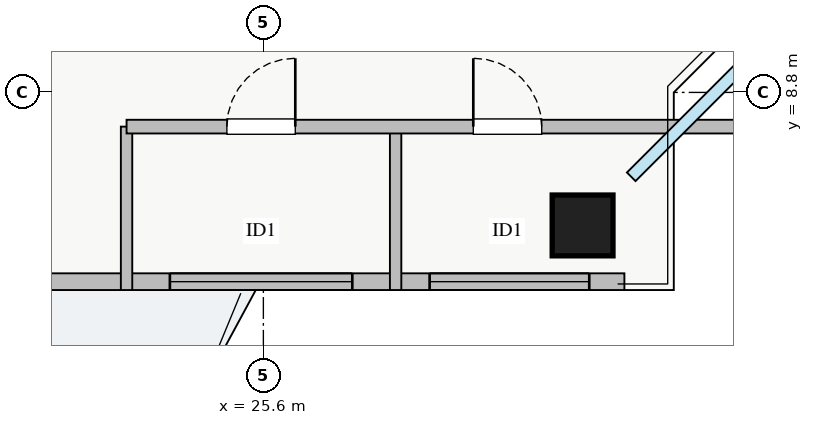
"""IFC4 building model, lengths in metres.
Left out: names, types, materials, properties, quantities, classifications, styles, units other than length and angle.
Written with IfcOpenShell. Run it as: python <this file> out.ifc"""

import sys

from ifc_helpers import new_model, si_unit, direction, frame, frame_2d, origin, origin_2d, place, context, subcontext, project, spatial, rectangle, extrude, source, transform, mapped, element, fill, save


model = new_model("IFC4")
c1 = context("Model", 3, precision=1e-05, world=origin(), true_north=direction((0.0, 1.0)))
c2 = subcontext(c1, "Body", "Model", "MODEL_VIEW")
j1 = project(units=[si_unit("LENGTHUNIT", "METRE"), si_unit("PLANEANGLEUNIT", "RADIAN")], contexts=[c1])
p1 = place(None, origin())
s1 = spatial("IfcSite", under=j1, at=p1, CompositionType="ELEMENT")
p2 = place(p1, origin())
s2 = spatial("IfcBuilding", under=s1, at=p2, CompositionType="ELEMENT")
p3 = place(p2, frame((0.0, 0.0, 219.75)))
s3 = spatial("IfcBuildingStorey", under=s2, at=p3, CompositionType="ELEMENT", Elevation=219.75)
m1 = source(origin(), c2, "Body", "SweptSolid", [
    extrude(rectangle(XDim=0.8, YDim=0.8, at=origin_2d()), origin(), (0.0, 0.0, 1.0), 3.25),
])
p4 = place(p3, frame((29.8, 7.05, 0.0), z_axis=(0.0, 0.0, 1.0), x_axis=(1.0, 0.0, 0.0)))
e1 = element("IfcColumn", 1, at=p4, inside=s3, PredefinedType="COLUMN", context=c2, shape_type="MappedRepresentation", body=[
    mapped(m1, transform((0.0, 0.0, 0.0), x_axis=(1.0, 0.0, 0.0), y_axis=(0.0, 1.0, 0.0), z_axis=(0.0, 0.0, 1.0), scale=1.0)),
])
p5 = place(p3, frame((7.65, 6.31, 0.0), z_axis=(0.0, 0.0, 1.0), x_axis=(1.0, 0.0, 0.0)))
e2 = element("IfcWall", 2, at=p5, inside=s3, PredefinedType="STANDARD", context=c2, shape_type="SweptSolid", body=[
    extrude(rectangle(XDim=22.7, YDim=0.22, at=frame_2d((11.35, 0.0))), origin(), (0.0, 0.0, 1.0), 2.61),
])
p6 = place(p5, frame((12.2, 0.0, 0.0)))
e3 = element("IfcOpeningElement", 3, at=p6, cuts=e2, PredefinedType="OPENING", context=c2, shape_type="SweptSolid", body=[
    extrude(rectangle(XDim=1.2, YDim=2.1, at=frame_2d((0.6, 1.05))), frame((0.0, 0.12, 0.0), z_axis=(0.0, -1.0, 0.0), x_axis=(1.0, 0.0, 0.0)), (0.0, 0.0, 1.0), 0.24),
])
p7 = place(p5, frame((1.637, 0.0, 0.9)))
e4 = element("IfcOpeningElement", 4, at=p7, cuts=e2, PredefinedType="OPENING", context=c2, shape_type="SweptSolid", body=[
    extrude(rectangle(XDim=2.4, YDim=1.48, at=frame_2d((1.2, 0.74))), frame((0.0, 0.12, 0.0), z_axis=(0.0, -1.0, 0.0), x_axis=(1.0, 0.0, 0.0)), (0.0, 0.0, 1.0), 0.24),
])
p8 = place(p5, frame((7.612, 0.0, 0.9)))
e5 = element("IfcOpeningElement", 5, at=p8, cuts=e2, PredefinedType="OPENING", context=c2, shape_type="SweptSolid", body=[
    extrude(rectangle(XDim=1.8, YDim=1.45, at=frame_2d((0.9, 0.725))), frame((0.0, 0.12, 0.0), z_axis=(0.0, -1.0, 0.0), x_axis=(1.0, 0.0, 0.0)), (0.0, 0.0, 1.0), 0.24),
])
p9 = place(p5, frame((20.137, 0.0, 0.9)))
e6 = element("IfcOpeningElement", 6, at=p9, cuts=e2, PredefinedType="OPENING", context=c2, shape_type="SweptSolid", body=[
    extrude(rectangle(XDim=2.1, YDim=1.5, at=frame_2d((1.05, 0.75))), frame((0.0, 0.12, 0.0), z_axis=(0.0, -1.0, 0.0), x_axis=(1.0, 0.0, 0.0)), (0.0, 0.0, 1.0), 0.24),
])
p10 = place(p5, frame((16.72, 0.0, 0.9)))
e7 = element("IfcOpeningElement", 7, at=p10, cuts=e2, PredefinedType="OPENING", context=c2, shape_type="SweptSolid", body=[
    extrude(rectangle(XDim=2.4, YDim=1.5, at=frame_2d((1.2, 0.75))), frame((0.0, 0.12, 0.0), z_axis=(0.0, -1.0, 0.0), x_axis=(1.0, 0.0, 0.0)), (0.0, 0.0, 1.0), 0.24),
])
for number, where, z_axis, x_axis in (
    (8, (23.8, 6.2, 0.0), (0.0, 0.0, 1.0), (0.0, 1.0, 0.0)),
    (9, (27.34, 6.2, 0.0), (0.0, 0.0, 1.0), (0.0, 1.0, 0.0)),
):
    element("IfcWall", number, at=place(p3, frame(where, z_axis=z_axis, x_axis=x_axis)), inside=s3, PredefinedType="PARTITIONING", context=c2, shape_type="SweptSolid", body=[
        extrude(rectangle(XDim=2.15, YDim=0.15, at=frame_2d((1.075, 0.0))), origin(), (0.0, 0.0, 1.0), 3.07),
    ])
p11 = place(p3, frame((23.8, 8.35, 0.0), z_axis=(0.0, 0.0, 1.0), x_axis=(1.0, 0.0, 0.0)))
e10 = element("IfcWall", 10, at=p11, inside=s3, PredefinedType="PARTITIONING", context=c2, shape_type="SweptSolid", body=[
    extrude(rectangle(XDim=8.65, YDim=0.18, at=frame_2d((4.325, 0.0))), origin(), (0.0, 0.0, 1.0), 3.07),
])
p12 = place(p11, frame((1.32, 0.0, 0.0)))
e11 = element("IfcOpeningElement", 11, at=p12, cuts=e10, PredefinedType="OPENING", context=c2, shape_type="SweptSolid", body=[
    extrude(rectangle(XDim=0.9, YDim=2.05, at=frame_2d((0.45, 1.025))), frame((0.0, 0.1, 0.0), z_axis=(0.0, -1.0, 0.0), x_axis=(1.0, 0.0, 0.0)), (0.0, 0.0, 1.0), 0.2),
])
p13 = place(p11, frame((4.562, 0.0, 0.0)))
e12 = element("IfcOpeningElement", 12, at=p13, cuts=e10, PredefinedType="OPENING", context=c2, shape_type="SweptSolid", body=[
    extrude(rectangle(XDim=0.9, YDim=2.05, at=frame_2d((0.45, 1.025))), frame((0.0, 0.1, 0.0), z_axis=(0.0, -1.0, 0.0), x_axis=(1.0, 0.0, 0.0)), (0.0, 0.0, 1.0), 0.2),
])
m2 = source(origin(), c2, "Body", "SweptSolid", [
    extrude(rectangle(XDim=2.1, YDim=1.5, at=frame_2d((1.05, 0.75))), frame((0.0, 0.03, 0.0), z_axis=(0.0, -1.0, 0.0), x_axis=(1.0, 0.0, 0.0)), (0.0, 0.0, 1.0), 0.06),
])
p14 = place(p9, origin())
e13 = element("IfcWindow", 13, at=p14, inside=s3, PartitioningType="TRIPLE_PANEL_VERTICAL", PredefinedType="WINDOW", context=c2, shape_type="MappedRepresentation", body=[
    mapped(m2, transform((0.0, 0.0, 0.0), x_axis=(1.0, 0.0, 0.0), y_axis=(0.0, 1.0, 0.0), z_axis=(0.0, 0.0, 1.0), scale=1.0)),
])
fill(e6, e13)
m3 = source(origin(), c2, "Body", "SweptSolid", [
    extrude(rectangle(XDim=0.9, YDim=2.05, at=frame_2d((0.45, 1.025))), frame((0.0, 0.025, 0.0), z_axis=(0.0, -1.0, 0.0), x_axis=(1.0, 0.0, 0.0)), (0.0, 0.0, 1.0), 0.05),
])
p15 = place(p12, origin())
e14 = element("IfcDoor", 14, at=p15, inside=s3, OperationType="SINGLE_SWING_RIGHT", PredefinedType="DOOR", context=c2, shape_type="MappedRepresentation", body=[
    mapped(m3, transform((0.0, 0.0, 0.0), x_axis=(1.0, 0.0, 0.0), y_axis=(0.0, 1.0, 0.0), z_axis=(0.0, 0.0, 1.0), scale=1.0)),
])
fill(e11, e14)
p16 = place(p13, origin())
e15 = element("IfcDoor", 15, at=p16, inside=s3, OperationType="SINGLE_SWING_LEFT", PredefinedType="DOOR", context=c2, shape_type="MappedRepresentation", body=[
    mapped(m3, transform((0.0, 0.0, 0.0), x_axis=(1.0, 0.0, 0.0), y_axis=(0.0, 1.0, 0.0), z_axis=(0.0, 0.0, 1.0), scale=1.0)),
])
fill(e12, e15)
m4 = source(origin(), c2, "Body", "SweptSolid", [
    extrude(rectangle(XDim=2.4, YDim=1.5, at=frame_2d((1.2, 0.75))), frame((0.0, 0.03, 0.0), z_axis=(0.0, -1.0, 0.0), x_axis=(1.0, 0.0, 0.0)), (0.0, 0.0, 1.0), 0.06),
])
p17 = place(p10, origin())
e16 = element("IfcWindow", 16, at=p17, inside=s3, PartitioningType="TRIPLE_PANEL_VERTICAL", PredefinedType="WINDOW", context=c2, shape_type="MappedRepresentation", body=[
    mapped(m4, transform((0.0, 0.0, 0.0), x_axis=(1.0, 0.0, 0.0), y_axis=(0.0, 1.0, 0.0), z_axis=(0.0, 0.0, 1.0), scale=1.0)),
])
fill(e7, e16)
save(model, sys.argv[1])
